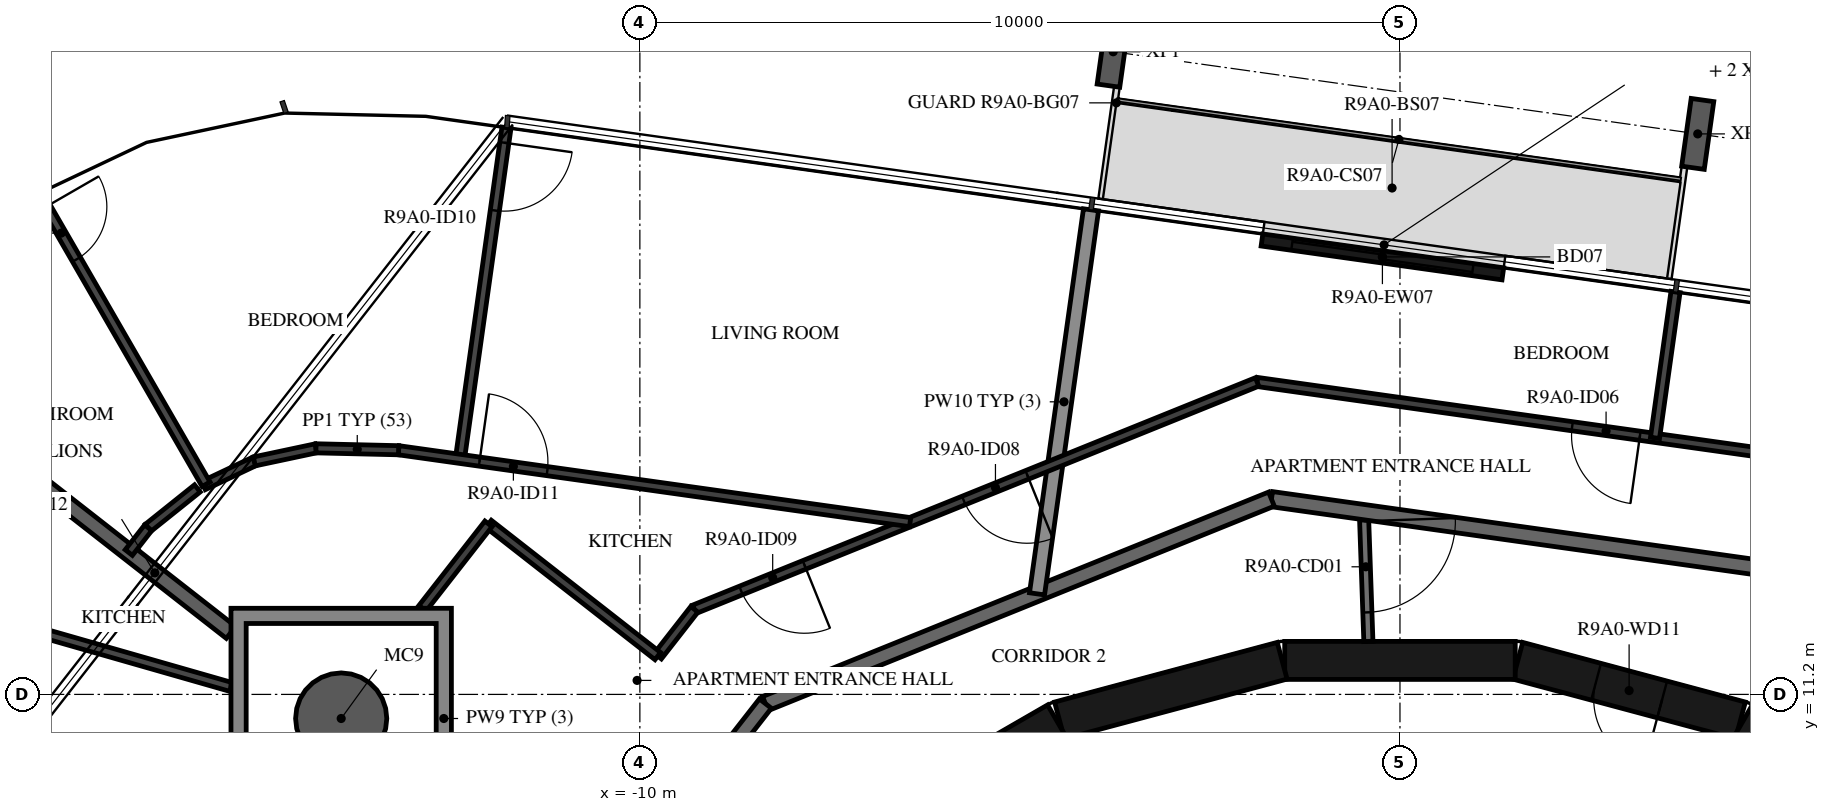
"""IFC4 building model, lengths in metres.
Left out: names, types, materials, properties, quantities, classifications, styles, units other than length and angle.
Written with IfcOpenShell. Run it as: python <this file> out.ifc"""

import sys

from ifc_helpers import new_model, si_unit, direction, frame, frame_2d, origin, origin_2d, place, context, subcontext, project, spatial, polyline, rectangle, hollow_circle, i_section, outline, extrude, element, fill, save


model = new_model("IFC4")
c1 = context("Model", 3, precision=1e-05, world=origin(), true_north=direction((0.0, 1.0)))
c2 = subcontext(c1, "Body", "Model", "MODEL_VIEW")
j1 = project(units=[si_unit("LENGTHUNIT", "METRE"), si_unit("PLANEANGLEUNIT", "RADIAN")], contexts=[c1])
p1 = place(None, origin())
s1 = spatial("IfcSite", under=j1, at=p1, CompositionType="ELEMENT")
p2 = place(p1, origin())
s2 = spatial("IfcBuilding", under=s1, at=p2, CompositionType="ELEMENT")
p3 = place(p2, frame((0.0, 0.0, 340.0)))
s3 = spatial("IfcBuildingStorey", under=s2, at=p3, CompositionType="ELEMENT", Elevation=340.0)
p4 = place(p3, frame((-13.929, 10.883, -0.38), z_axis=(0.0, 0.0, 1.0), x_axis=(1.0, 0.0, 0.0)))
e1 = element("IfcColumn", 1, at=p4, inside=s3, PredefinedType="COLUMN", context=c2, shape_type="SweptSolid", body=[
    extrude(hollow_circle(Radius=0.6, WallThickness=0.03, at=origin_2d()), origin(), (0.0, 0.0, 1.0), 3.5),
])
for number, where, z_axis, x_axis in (
    (2, (3.917, 18.574, -0.38), (0.0, 0.0, 1.0), (0.99, -0.139, 0.0)),
    (3, (-3.773, 19.655, -0.38), (0.0, 0.0, 1.0), (0.99, -0.139, 0.0)),
):
    element("IfcColumn", number, at=place(p3, frame(where, z_axis=z_axis, x_axis=x_axis)), inside=s3, PredefinedType="COLUMN", context=c2, shape_type="SweptSolid", body=[
        extrude(i_section(OverallWidth=0.3, OverallDepth=0.9, WebThickness=0.019, FlangeThickness=0.035, FilletRadius=0.03, at=origin_2d()), origin(), (0.0, 0.0, 1.0), 3.5),
    ])
p5 = place(p3, frame((1.354, 16.733, 0.0), z_axis=(0.0, 0.0, 1.0), x_axis=(-0.990270382149, 0.139156639217, 0.0)))
e4 = element("IfcWall", 4, at=p5, inside=s3, PredefinedType="STANDARD", context=c2, shape_type="SweptSolid", body=[
    extrude(rectangle(XDim=3.2, YDim=0.16, at=frame_2d((1.6, 0.0))), origin(), (0.0, 0.0, 1.0), 3.12),
])
p6 = place(p5, frame((0.4, 0.0, 0.0)))
e5 = element("IfcOpeningElement", 5, at=p6, cuts=e4, PredefinedType="OPENING", context=c2, shape_type="SweptSolid", body=[
    extrude(rectangle(XDim=2.4, YDim=2.4, at=frame_2d((1.2, 1.2))), frame((0.0, 0.09, 0.0), z_axis=(0.0, -1.0, 0.0), x_axis=(1.0, 0.0, 0.0)), (0.0, 0.0, 1.0), 0.18),
])
p7 = place(p3, frame((7.137, 9.329, 0.0), z_axis=(0.0, 0.0, 1.0), x_axis=(-0.865975092491, 0.500087131594, 0.0)))
e6 = element("IfcWall", 6, at=p7, inside=s3, PredefinedType="SHEAR", context=c2, shape_type="SweptSolid", body=[
    extrude(rectangle(XDim=3.033, YDim=0.5, at=frame_2d((1.516, 0.0))), origin(), (0.0, 0.0, 1.0), 3.12),
])
p8 = place(p3, frame((4.479, 10.858, 0.0), z_axis=(0.0, 0.0, 1.0), x_axis=(-0.965948410781, 0.258734743916, 0.0)))
e7 = element("IfcWall", 7, at=p8, inside=s3, PredefinedType="SHEAR", context=c2, shape_type="SweptSolid", body=[
    extrude(rectangle(XDim=3.033, YDim=0.5, at=frame_2d((1.516, 0.0))), origin(), (0.0, 0.0, 1.0), 3.12),
])
p9 = place(p8, frame((1.066, 0.0, 0.0)))
e8 = element("IfcOpeningElement", 8, at=p9, cuts=e7, PredefinedType="OPENING", context=c2, shape_type="SweptSolid", body=[
    extrude(rectangle(XDim=0.9, YDim=2.1, at=frame_2d((0.45, 1.05))), frame((0.0, 0.26, 0.0), z_axis=(0.0, -1.0, 0.0), x_axis=(1.0, 0.0, 0.0)), (0.0, 0.0, 1.0), 0.52),
])
for number, where, z_axis, x_axis in (
    (9, (1.516, 11.647, 0.0), (0.0, 0.0, 1.0), (-1.0, 0.0, 0.0)),
    (10, (-1.55, 11.643, 0.0), (0.0, 0.0, 1.0), (-0.966, -0.259, 0.0)),
    (11, (-4.51, 10.845, 0.0), (0.0, 0.0, 1.0), (-0.866, -0.5, 0.0)),
):
    element("IfcWall", number, at=place(p3, frame(where, z_axis=z_axis, x_axis=x_axis)), inside=s3, PredefinedType="SHEAR", context=c2, shape_type="SweptSolid", body=[
        extrude(rectangle(XDim=3.033, YDim=0.5, at=frame_2d((1.516, 0.0))), origin(), (0.0, 0.0, 1.0), 3.12),
    ])
p10 = place(p3, frame((-0.475, 13.598, 0.0), z_axis=(0.0, 0.0, 1.0), x_axis=(0.034852521429, -0.999392466326, 0.0)))
e12 = element("IfcWall", 12, at=p10, inside=s3, PredefinedType="PARTITIONING", context=c2, shape_type="SweptSolid", body=[
    extrude(rectangle(XDim=1.702, YDim=0.12, at=frame_2d((0.851, 0.0))), origin(), (0.0, 0.0, 1.0), 3.12),
])
p11 = place(p10, frame((0.12, 0.0, 0.0)))
e13 = element("IfcOpeningElement", 13, at=p11, cuts=e12, PredefinedType="OPENING", context=c2, shape_type="SweptSolid", body=[
    extrude(rectangle(XDim=1.2, YDim=2.1, at=frame_2d((0.6, 1.05))), frame((0.0, 0.07, 0.0), z_axis=(0.0, -1.0, 0.0), x_axis=(1.0, 0.0, 0.0)), (0.0, 0.0, 1.0), 0.14),
])
p12 = place(p3, frame((5.42, 12.77, 0.0), z_axis=(0.0, 0.0, 1.0), x_axis=(-0.990270565508, 0.139155334385, 0.0)))
e14 = element("IfcWall", 14, at=p12, inside=s3, PredefinedType="STANDARD", context=c2, shape_type="SweptSolid", body=[
    extrude(rectangle(XDim=7.181, YDim=0.2, at=frame_2d((3.59, 0.0))), origin(), (0.0, 0.0, 1.0), 3.12),
])
p13 = place(p3, frame((-1.691, 13.769, 0.0), z_axis=(0.0, 0.0, 1.0), x_axis=(-0.92717916932, -0.374618189599, 0.0)))
e15 = element("IfcWall", 15, at=p13, inside=s3, PredefinedType="STANDARD", context=c2, shape_type="SweptSolid", body=[
    extrude(rectangle(XDim=7.181, YDim=0.2, at=frame_2d((3.591, 0.0))), origin(), (0.0, 0.0, 1.0), 3.12),
])
p14 = place(p3, frame((-8.349, 11.079, 0.0), z_axis=(0.0, 0.0, 1.0), x_axis=(-0.615669112324, -0.78800478687, 0.0)))
e16 = element("IfcWall", 16, at=p14, inside=s3, PredefinedType="STANDARD", context=c2, shape_type="SweptSolid", body=[
    extrude(rectangle(XDim=7.181, YDim=0.2, at=frame_2d((3.591, 0.0))), origin(), (0.0, 0.0, 1.0), 3.12),
])
p15 = place(p14, frame((2.1, 0.0, 0.0)))
e17 = element("IfcOpeningElement", 17, at=p15, cuts=e16, PredefinedType="OPENING", context=c2, shape_type="SweptSolid", body=[
    extrude(rectangle(XDim=1.0, YDim=2.1, at=frame_2d((0.5, 1.05))), frame((0.0, 0.11, 0.0), z_axis=(0.0, -1.0, 0.0), x_axis=(1.0, 0.0, 0.0)), (0.0, 0.0, 1.0), 0.22),
])
p16 = place(p14, frame((3.811, 0.0, 0.0)))
e18 = element("IfcOpeningElement", 18, at=p16, cuts=e16, PredefinedType="OPENING", context=c2, shape_type="SweptSolid", body=[
    extrude(rectangle(XDim=1.0, YDim=2.1, at=frame_2d((0.5, 1.05))), frame((0.0, 0.11, 0.0), z_axis=(0.0, -1.0, 0.0), x_axis=(1.0, 0.0, 0.0)), (0.0, 0.0, 1.0), 0.22),
])
p17 = place(p3, frame((-4.065, 17.575, 0.0), z_axis=(0.0, 0.0, 1.0), x_axis=(-0.139163175955, -0.990269463559, 0.0)))
e19 = element("IfcWall", 19, at=p17, inside=s3, PredefinedType="STANDARD", context=c2, shape_type="SweptSolid", body=[
    extrude(rectangle(XDim=5.102, YDim=0.2, at=frame_2d((2.551, 0.0))), origin(), (0.0, 0.0, 1.0), 2.73),
])
p18 = place(p3, frame((-20.191, 15.775, 0.0), z_axis=(0.0, 0.0, 1.0), x_axis=(0.788021948923, -0.615647145706, 0.0)))
e20 = element("IfcWall", 20, at=p18, inside=s3, PredefinedType="STANDARD", context=c2, shape_type="SweptSolid", body=[
    extrude(rectangle(XDim=6.106, YDim=0.2, at=frame_2d((3.053, 0.0))), origin(), (0.0, 0.0, 1.0), 3.12),
])
p19 = place(p3, frame((6.027, 14.199, 0.0), z_axis=(0.0, 0.0, 1.0), x_axis=(-0.990271593532, 0.139148018469, 0.0)))
e21 = element("IfcWall", 21, at=p19, inside=s3, PredefinedType="PARTITIONING", context=c2, shape_type="SweptSolid", body=[
    extrude(rectangle(XDim=7.985, YDim=0.12, at=frame_2d((3.992, 0.0))), origin(), (0.0, 0.0, 1.0), 3.12),
])
p20 = place(p19, frame((2.898, 0.0, 0.0)))
e22 = element("IfcOpeningElement", 22, at=p20, cuts=e21, PredefinedType="OPENING", context=c2, shape_type="SweptSolid", body=[
    extrude(rectangle(XDim=0.9, YDim=2.1, at=frame_2d((0.45, 1.05))), frame((0.0, 0.07, 0.0), z_axis=(0.0, -1.0, 0.0), x_axis=(1.0, 0.0, 0.0)), (0.0, 0.0, 1.0), 0.14),
])
p21 = place(p3, frame((-1.88, 15.311, 0.0), z_axis=(0.0, 0.0, 1.0), x_axis=(-0.927184866592, -0.374604088557, 0.0)))
e23 = element("IfcWall", 23, at=p21, inside=s3, PredefinedType="PARTITIONING", context=c2, shape_type="SweptSolid", body=[
    extrude(rectangle(XDim=7.985, YDim=0.12, at=frame_2d((3.993, 0.0))), origin(), (0.0, 0.0, 1.0), 3.12),
])
p22 = place(p21, frame((3.262, 0.0, 0.0)))
e24 = element("IfcOpeningElement", 24, at=p22, cuts=e23, PredefinedType="OPENING", context=c2, shape_type="SweptSolid", body=[
    extrude(rectangle(XDim=0.9, YDim=2.1, at=frame_2d((0.45, 1.05))), frame((0.0, 0.07, 0.0), z_axis=(0.0, -1.0, 0.0), x_axis=(1.0, 0.0, 0.0)), (0.0, 0.0, 1.0), 0.14),
])
p23 = place(p21, frame((6.423, 0.0, 0.0)))
e25 = element("IfcOpeningElement", 25, at=p23, cuts=e23, PredefinedType="OPENING", context=c2, shape_type="SweptSolid", body=[
    extrude(rectangle(XDim=0.9, YDim=2.1, at=frame_2d((0.45, 1.05))), frame((0.0, 0.07, 0.0), z_axis=(0.0, -1.0, 0.0), x_axis=(1.0, 0.0, 0.0)), (0.0, 0.0, 1.0), 0.14),
])
p24 = place(p3, frame((3.625, 16.494, 0.0), z_axis=(0.0, 0.0, 1.0), x_axis=(-0.139181494832, -0.990266889023, 0.0)))
e26 = element("IfcWall", 26, at=p24, inside=s3, PredefinedType="PARTITIONING", context=c2, shape_type="SweptSolid", body=[
    extrude(rectangle(XDim=1.938, YDim=0.12, at=frame_2d((0.969, 0.0))), origin(), (0.0, 0.0, 1.0), 2.73),
])
p25 = place(p3, frame((-9.283, 12.319, 0.0), z_axis=(0.0, 0.0, 1.0), x_axis=(-0.615735018346, -0.787953289975, 0.0)))
e27 = element("IfcWall", 27, at=p25, inside=s3, PredefinedType="PARTITIONING", context=c2, shape_type="SweptSolid", body=[
    extrude(rectangle(XDim=0.781, YDim=0.12, at=frame_2d((0.391, 0.0))), origin(), (0.0, 0.0, 1.0), 3.12),
])
p26 = place(p3, frame((-9.764, 11.704, 0.0), z_axis=(0.0, 0.0, 1.0), x_axis=(-0.787996873396, 0.615679240772, 0.0)))
e28 = element("IfcWall", 28, at=p26, inside=s3, PredefinedType="PARTITIONING", context=c2, shape_type="SweptSolid", body=[
    extrude(rectangle(XDim=2.826, YDim=0.12, at=frame_2d((1.413, 0.0))), origin(), (0.0, 0.0, 1.0), 3.12),
])
p27 = place(p3, frame((-11.992, 13.444, 0.0), z_axis=(0.0, 0.0, 1.0), x_axis=(-0.615593635541, -0.788063751153, 0.0)))
e29 = element("IfcWall", 29, at=p27, inside=s3, PredefinedType="PARTITIONING", context=c2, shape_type="SweptSolid", body=[
    extrude(rectangle(XDim=1.41, YDim=0.12, at=frame_2d((0.705, 0.0))), origin(), (0.0, 0.0, 1.0), 3.12),
])
p28 = place(p3, frame((-11.755, 18.656, 0.0), z_axis=(0.0, 0.0, 1.0), x_axis=(-0.13916046232, -0.990269844904, 0.0)))
e30 = element("IfcWall", 30, at=p28, inside=s3, PredefinedType="PARTITIONING", context=c2, shape_type="SweptSolid", body=[
    extrude(rectangle(XDim=4.4, YDim=0.12, at=frame_2d((2.2, 0.0))), origin(), (0.0, 0.0, 1.0), 2.73),
])
p29 = place(p28, frame((0.2, 0.0, 0.0)))
e31 = element("IfcOpeningElement", 31, at=p29, cuts=e30, PredefinedType="OPENING", context=c2, shape_type="SweptSolid", body=[
    extrude(rectangle(XDim=0.9, YDim=2.1, at=frame_2d((0.45, 1.05))), frame((0.0, 0.07, 0.0), z_axis=(0.0, -1.0, 0.0), x_axis=(1.0, 0.0, 0.0)), (0.0, 0.0, 1.0), 0.14),
])
p30 = place(p3, frame((-13.175, 14.412, 0.0), z_axis=(0.0, 0.0, 1.0), x_axis=(0.990264549393, -0.139198140128, 0.0)))
e32 = element("IfcWall", 32, at=p30, inside=s3, PredefinedType="PARTITIONING", context=c2, shape_type="SweptSolid", body=[
    extrude(rectangle(XDim=6.796, YDim=0.12, at=frame_2d((3.398, 0.0))), origin(), (0.0, 0.0, 1.0), 3.12),
])
p31 = place(p30, frame((1.075, 0.0, 0.0)))
e33 = element("IfcOpeningElement", 33, at=p31, cuts=e32, PredefinedType="OPENING", context=c2, shape_type="SweptSolid", body=[
    extrude(rectangle(XDim=0.9, YDim=2.1, at=frame_2d((0.45, 1.05))), frame((0.0, 0.07, 0.0), z_axis=(0.0, -1.0, 0.0), x_axis=(1.0, 0.0, 0.0)), (0.0, 0.0, 1.0), 0.14),
])
p32 = place(p3, frame((-15.743, 13.948, 0.0), z_axis=(0.0, 0.0, 1.0), x_axis=(0.903885078158, 0.427775368019, 0.0)))
e34 = element("IfcWall", 34, at=p32, inside=s3, PredefinedType="PARTITIONING", context=c2, shape_type="SweptSolid", body=[
    extrude(rectangle(XDim=0.742, YDim=0.12, at=frame_2d((0.371, 0.0))), origin(), (0.0, 0.0, 1.0), 3.12),
])
p33 = place(p3, frame((-15.072, 14.265, 0.0), z_axis=(0.0, 0.0, 1.0), x_axis=(0.978141630921, 0.207939774595, 0.0)))
e35 = element("IfcWall", 35, at=p33, inside=s3, PredefinedType="PARTITIONING", context=c2, shape_type="SweptSolid", body=[
    extrude(rectangle(XDim=0.829, YDim=0.12, at=frame_2d((0.415, 0.0))), origin(), (0.0, 0.0, 1.0), 3.12),
])
p34 = place(p3, frame((-14.261, 14.438, 0.0), z_axis=(0.0, 0.0, 1.0), x_axis=(0.999732237365, -0.023139869764, 0.0)))
e36 = element("IfcWall", 36, at=p34, inside=s3, PredefinedType="PARTITIONING", context=c2, shape_type="SweptSolid", body=[
    extrude(rectangle(XDim=1.087, YDim=0.12, at=frame_2d((0.543, 0.0))), origin(), (0.0, 0.0, 1.0), 3.12),
])
p35 = place(p3, frame((-17.912, 17.789, 0.0), z_axis=(0.0, 0.0, 1.0), x_axis=(0.499601164034, -0.866255549417, 0.0)))
e37 = element("IfcWall", 37, at=p35, inside=s3, PredefinedType="PARTITIONING", context=c2, shape_type="SweptSolid", body=[
    extrude(rectangle(XDim=4.415, YDim=0.12, at=frame_2d((2.207, 0.0))), origin(), (0.0, 0.0, 1.0), 2.73),
])
p36 = place(p35, frame((0.2, 0.0, 0.0)))
e38 = element("IfcOpeningElement", 38, at=p36, cuts=e37, PredefinedType="OPENING", context=c2, shape_type="SweptSolid", body=[
    extrude(rectangle(XDim=0.8, YDim=2.1, at=frame_2d((0.4, 1.05))), frame((0.0, 0.07, 0.0), z_axis=(0.0, -1.0, 0.0), x_axis=(1.0, 0.0, 0.0)), (0.0, 0.0, 1.0), 0.14),
])
p37 = place(p3, frame((-15.821, 13.91, 0.0), z_axis=(0.0, 0.0, 1.0), x_axis=(-0.780840072472, -0.624730967074, 0.0)))
e39 = element("IfcWall", 39, at=p37, inside=s3, PredefinedType="PARTITIONING", context=c2, shape_type="SweptSolid", body=[
    extrude(rectangle(XDim=0.829, YDim=0.12, at=frame_2d((0.415, 0.0))), origin(), (0.0, 0.0, 1.0), 3.12),
])
p38 = place(p3, frame((-16.469, 13.393, 0.0), z_axis=(0.0, 0.0, 1.0), x_axis=(-0.615815563257, -0.787890342656, 0.0)))
e40 = element("IfcWall", 40, at=p38, inside=s3, PredefinedType="PARTITIONING", context=c2, shape_type="SweptSolid", body=[
    extrude(rectangle(XDim=0.414, YDim=0.12, at=frame_2d((0.207, 0.0))), origin(), (0.0, 0.0, 1.0), 3.12),
])
p39 = place(p3, frame((-21.594, 13.077, 0.0), z_axis=(0.0, 0.0, 1.0), x_axis=(0.961389857774, -0.275190009576, 0.0)))
e41 = element("IfcWall", 41, at=p39, inside=s3, PredefinedType="PARTITIONING", context=c2, shape_type="SweptSolid", body=[
    extrude(rectangle(XDim=6.464, YDim=0.12, at=frame_2d((3.232, 0.0))), origin(), (0.0, 0.0, 1.0), 2.73),
])
p40 = place(p39, frame((0.2, 0.0, 0.0)))
e42 = element("IfcOpeningElement", 42, at=p40, cuts=e41, PredefinedType="OPENING", context=c2, shape_type="SweptSolid", body=[
    extrude(rectangle(XDim=0.9, YDim=2.1, at=frame_2d((0.45, 1.05))), frame((0.0, 0.07, 0.0), z_axis=(0.0, -1.0, 0.0), x_axis=(1.0, 0.0, 0.0)), (0.0, 0.0, 1.0), 0.14),
])
p41 = place(p3, origin())
e43 = element("IfcWall", 43, at=p41, inside=s3, PredefinedType="STANDARD", context=c2, shape_type="SweptSolid", body=[
    extrude(outline(polyline([(-12.479, 12.333), (-12.479, 9.433), (-15.379, 9.433), (-15.379, 12.333), (-12.479, 12.333)]), holes=[polyline([(-15.179, 9.633), (-12.679, 9.633), (-12.679, 12.133), (-15.179, 12.133), (-15.179, 9.633)])]), origin(), (0.0, 0.0, 1.0), 3.12),
])
p42 = place(p6, origin())
e44 = element("IfcDoor", 44, at=p42, inside=s3, OperationType="DOUBLE_DOOR_SLIDING", PredefinedType="DOOR", context=c2, shape_type="SweptSolid", body=[
    extrude(rectangle(XDim=2.4, YDim=2.4, at=frame_2d((1.2, 1.2))), frame((0.0, 0.025, 0.0), z_axis=(0.0, -1.0, 0.0), x_axis=(1.0, 0.0, 0.0)), (0.0, 0.0, 1.0), 0.05),
])
fill(e5, e44)
p43 = place(p9, origin())
e45 = element("IfcDoor", 45, at=p43, inside=s3, OperationType="SINGLE_SWING_LEFT", PredefinedType="DOOR", context=c2, shape_type="SweptSolid", body=[
    extrude(rectangle(XDim=0.9, YDim=2.1, at=frame_2d((0.45, 1.05))), frame((0.0, 0.025, 0.0), z_axis=(0.0, -1.0, 0.0), x_axis=(1.0, 0.0, 0.0)), (0.0, 0.0, 1.0), 0.05),
])
fill(e8, e45)
p44 = place(p20, origin())
e46 = element("IfcDoor", 46, at=p44, inside=s3, OperationType="SINGLE_SWING_LEFT", PredefinedType="DOOR", context=c2, shape_type="SweptSolid", body=[
    extrude(rectangle(XDim=0.9, YDim=2.1, at=frame_2d((0.45, 1.05))), frame((0.0, 0.025, 0.0), z_axis=(0.0, -1.0, 0.0), x_axis=(1.0, 0.0, 0.0)), (0.0, 0.0, 1.0), 0.05),
])
fill(e22, e46)
p45 = place(p22, origin())
e47 = element("IfcDoor", 47, at=p45, inside=s3, OperationType="SINGLE_SWING_RIGHT", PredefinedType="DOOR", context=c2, shape_type="SweptSolid", body=[
    extrude(rectangle(XDim=0.9, YDim=2.1, at=frame_2d((0.45, 1.05))), frame((0.0, 0.025, 0.0), z_axis=(0.0, -1.0, 0.0), x_axis=(1.0, 0.0, 0.0)), (0.0, 0.0, 1.0), 0.05),
])
fill(e24, e47)
p46 = place(p23, origin())
e48 = element("IfcDoor", 48, at=p46, inside=s3, OperationType="SINGLE_SWING_RIGHT", PredefinedType="DOOR", context=c2, shape_type="SweptSolid", body=[
    extrude(rectangle(XDim=0.9, YDim=2.1, at=frame_2d((0.45, 1.05))), frame((0.0, 0.025, 0.0), z_axis=(0.0, -1.0, 0.0), x_axis=(1.0, 0.0, 0.0)), (0.0, 0.0, 1.0), 0.05),
])
fill(e25, e48)
p47 = place(p29, origin())
e49 = element("IfcDoor", 49, at=p47, inside=s3, OperationType="SINGLE_SWING_RIGHT", PredefinedType="DOOR", context=c2, shape_type="SweptSolid", body=[
    extrude(rectangle(XDim=0.9, YDim=2.1, at=frame_2d((0.45, 1.05))), frame((0.0, 0.025, 0.0), z_axis=(0.0, -1.0, 0.0), x_axis=(1.0, 0.0, 0.0)), (0.0, 0.0, 1.0), 0.05),
])
fill(e31, e49)
p48 = place(p36, origin())
e50 = element("IfcDoor", 50, at=p48, inside=s3, OperationType="SINGLE_SWING_RIGHT", PredefinedType="DOOR", context=c2, shape_type="SweptSolid", body=[
    extrude(rectangle(XDim=0.8, YDim=2.1, at=frame_2d((0.4, 1.05))), frame((0.0, 0.025, 0.0), z_axis=(0.0, -1.0, 0.0), x_axis=(1.0, 0.0, 0.0)), (0.0, 0.0, 1.0), 0.05),
])
fill(e38, e50)
p49 = place(p31, origin())
e51 = element("IfcDoor", 51, at=p49, inside=s3, OperationType="SINGLE_SWING_LEFT", PredefinedType="DOOR", context=c2, shape_type="SweptSolid", body=[
    extrude(rectangle(XDim=0.9, YDim=2.1, at=frame_2d((0.45, 1.05))), frame((0.0, 0.025, 0.0), z_axis=(0.0, -1.0, 0.0), x_axis=(1.0, 0.0, 0.0)), (0.0, 0.0, 1.0), 0.05),
])
fill(e33, e51)
p50 = place(p11, origin())
e52 = element("IfcDoor", 52, at=p50, inside=s3, OperationType="DOUBLE_DOOR_SINGLE_SWING", PredefinedType="DOOR", context=c2, shape_type="SweptSolid", body=[
    extrude(rectangle(XDim=1.2, YDim=2.1, at=frame_2d((0.6, 1.05))), frame((0.0, 0.025, 0.0), z_axis=(0.0, -1.0, 0.0), x_axis=(1.0, 0.0, 0.0)), (0.0, 0.0, 1.0), 0.05),
])
fill(e13, e52)
save(model, sys.argv[1])
